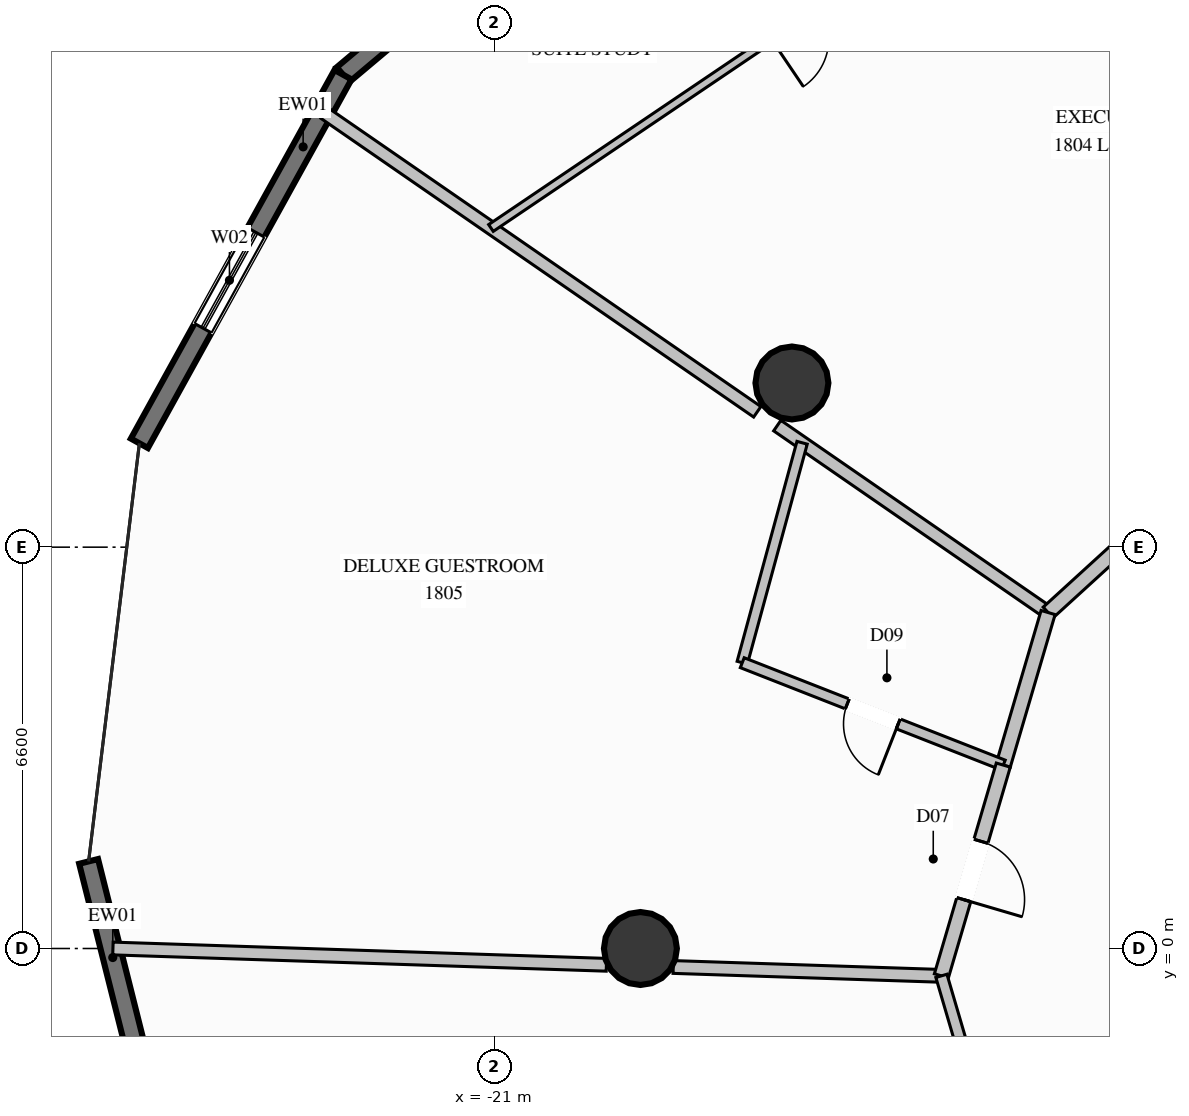
"""IFC4 building model, lengths in metres.
Left out: names, types, materials, properties, quantities, classifications, styles, units other than length and angle.
Written with IfcOpenShell. Run it as: python <this file> out.ifc"""

import sys

from ifc_helpers import new_model, si_unit, direction, frame, frame_2d, origin, origin_2d, place, context, subcontext, project, spatial, rectangle, circle, extrude, element, fill, save


model = new_model("IFC4")
c1 = context("Model", 3, precision=1e-05, world=origin(), true_north=direction((0.0, 1.0)))
c2 = subcontext(c1, "Body", "Model", "MODEL_VIEW")
j1 = project(units=[si_unit("LENGTHUNIT", "METRE"), si_unit("PLANEANGLEUNIT", "RADIAN")], contexts=[c1])
p1 = place(None, origin())
s1 = spatial("IfcSite", under=j1, at=p1, CompositionType="ELEMENT")
p2 = place(p1, origin())
s2 = spatial("IfcBuilding", under=s1, at=p2, CompositionType="ELEMENT")
p3 = place(p2, frame((0.0, 0.0, 68.0)))
s3 = spatial("IfcBuildingStorey", under=s2, at=p3, CompositionType="ELEMENT", Elevation=68.0)
for number, where, z_axis, x_axis in (
    (1, (-16.108, 9.3, 0.0), (0.0, 0.0, 1.0), (1.0, 0.0, 0.0)),
    (2, (-18.6, 0.0, 0.0), (0.0, 0.0, 1.0), (1.0, 0.0, 0.0)),
):
    element("IfcColumn", number, at=place(p3, frame(where, z_axis=z_axis, x_axis=x_axis)), inside=s3, PredefinedType="COLUMN", context=c2, shape_type="SweptSolid", body=[
        extrude(circle(Radius=0.6, at=origin_2d()), origin(), (0.0, 0.0, 1.0), 3.6),
    ])
p4 = place(p3, frame((-23.491, 14.37, 0.0), z_axis=(0.0, 0.0, 1.0), x_axis=(0.765388915414, 0.643568029164, 0.0)))
e3 = element("IfcWall", 3, at=p4, inside=s3, PredefinedType="SOLIDWALL", context=c2, shape_type="SweptSolid", body=[
    extrude(rectangle(XDim=7.233, YDim=0.32, at=frame_2d((3.616, 0.0))), origin(), (0.0, 0.0, 1.0), 3.34),
])
p5 = place(p4, frame((2.289, 0.0, 0.35)))
e4 = element("IfcOpeningElement", 4, at=p5, cuts=e3, PredefinedType="OPENING", context=c2, shape_type="SweptSolid", body=[
    extrude(rectangle(XDim=1.8, YDim=2.6, at=frame_2d((0.9, 1.3))), frame((0.0, 0.17, 0.0), z_axis=(0.0, -1.0, 0.0), x_axis=(1.0, 0.0, 0.0)), (0.0, 0.0, 1.0), 0.34),
])
p6 = place(p3, frame((-26.84, 8.308, 0.0), z_axis=(0.0, 0.0, 1.0), x_axis=(0.483582354317, 0.875298867013, 0.0)))
e5 = element("IfcWall", 5, at=p6, inside=s3, PredefinedType="SOLIDWALL", context=c2, shape_type="SweptSolid", body=[
    extrude(rectangle(XDim=6.926, YDim=0.32, at=frame_2d((3.463, 0.0))), origin(), (0.0, 0.0, 1.0), 3.34),
])
p7 = place(p6, frame((2.163, 0.0, 0.35)))
e6 = element("IfcOpeningElement", 6, at=p7, cuts=e5, PredefinedType="OPENING", context=c2, shape_type="SweptSolid", body=[
    extrude(rectangle(XDim=1.8, YDim=2.6, at=frame_2d((0.9, 1.3))), frame((0.0, 0.17, 0.0), z_axis=(0.0, -1.0, 0.0), x_axis=(1.0, 0.0, 0.0)), (0.0, 0.0, 1.0), 0.34),
])
p8 = place(p3, frame((-25.913, -5.583, 0.0), z_axis=(0.0, 0.0, 1.0), x_axis=(-0.243607685094, 0.969873855593, 0.0)))
e7 = element("IfcWall", 7, at=p8, inside=s3, PredefinedType="SOLIDWALL", context=c2, shape_type="SweptSolid", body=[
    extrude(rectangle(XDim=7.233, YDim=0.32, at=frame_2d((3.616, 0.0))), origin(), (0.0, 0.0, 1.0), 3.34),
])
p9 = place(p8, frame((1.923, 0.0, 0.35)))
e8 = element("IfcOpeningElement", 8, at=p9, cuts=e7, PredefinedType="OPENING", context=c2, shape_type="SweptSolid", body=[
    extrude(rectangle(XDim=1.8, YDim=2.6, at=frame_2d((0.9, 1.3))), frame((0.0, 0.17, 0.0), z_axis=(0.0, -1.0, 0.0), x_axis=(1.0, 0.0, 0.0)), (0.0, 0.0, 1.0), 0.34),
])
p10 = place(p3, frame((-11.895, 5.525, 0.0), z_axis=(0.0, 0.0, 1.0), x_axis=(-0.823003351356, 0.56803651613, 0.0)))
e9 = element("IfcWall", 9, at=p10, inside=s3, PredefinedType="PARTITIONING", context=c2, shape_type="SweptSolid", body=[
    extrude(rectangle(XDim=5.412, YDim=0.21, at=frame_2d((2.706, 0.0))), origin(), (0.0, 0.0, 1.0), 3.34),
])
p11 = place(p3, frame((-16.678, 8.826, 0.0), z_axis=(0.0, 0.0, 1.0), x_axis=(-0.823003432382, 0.568036398735, 0.0)))
e10 = element("IfcWall", 10, at=p11, inside=s3, PredefinedType="PARTITIONING", context=c2, shape_type="SweptSolid", body=[
    extrude(rectangle(XDim=8.647, YDim=0.21, at=frame_2d((4.324, 0.0))), origin(), (0.0, 0.0, 1.0), 3.34),
])
p12 = place(p3, frame((-13.65, -0.45, 0.0), z_axis=(0.0, 0.0, 1.0), x_axis=(-0.999452495438, 0.033086392398, 0.0)))
e11 = element("IfcWall", 11, at=p12, inside=s3, PredefinedType="PARTITIONING", context=c2, shape_type="SweptSolid", body=[
    extrude(rectangle(XDim=4.413, YDim=0.21, at=frame_2d((2.206, 0.0))), origin(), (0.0, 0.0, 1.0), 2.709),
])
p13 = place(p3, frame((-19.159, -0.268, 0.0), z_axis=(0.0, 0.0, 1.0), x_axis=(-0.999454971643, 0.033011507952, 0.0)))
e12 = element("IfcWall", 12, at=p13, inside=s3, PredefinedType="PARTITIONING", context=c2, shape_type="SweptSolid", body=[
    extrude(rectangle(XDim=8.12, YDim=0.21, at=frame_2d((4.06, 0.0))), origin(), (0.0, 0.0, 1.0), 3.34),
])
p14 = place(p3, frame((-7.1, 9.899, 0.0), z_axis=(0.0, 0.0, 1.0), x_axis=(-0.73878836807, -0.673937495028, 0.0)))
e13 = element("IfcWall", 13, at=p14, inside=s3, PredefinedType="PARTITIONING", context=c2, shape_type="SweptSolid", body=[
    extrude(rectangle(XDim=6.49, YDim=0.24, at=frame_2d((3.245, 0.0))), origin(), (0.0, 0.0, 1.0), 3.34),
])
p15 = place(p3, frame((-11.059, 18.604, 0.0), z_axis=(0.0, 0.0, 1.0), x_axis=(-0.828635640213, -0.559788331219, 0.0)))
e14 = element("IfcWall", 14, at=p15, inside=s3, PredefinedType="PARTITIONING", context=c2, shape_type="SweptSolid", body=[
    extrude(rectangle(XDim=12.067, YDim=0.135, at=frame_2d((6.033, 0.0))), origin(), (0.0, 0.0, 1.0), 3.34),
])
p16 = place(p15, frame((5.558, 0.0, 0.0)))
e15 = element("IfcOpeningElement", 15, at=p16, cuts=e14, PredefinedType="OPENING", context=c2, shape_type="SweptSolid", body=[
    extrude(rectangle(XDim=0.95, YDim=2.1, at=frame_2d((0.475, 1.05))), frame((0.0, 0.078, 0.0), z_axis=(0.0, -1.0, 0.0), x_axis=(1.0, 0.0, 0.0)), (0.0, 0.0, 1.0), 0.155),
])
p17 = place(p3, frame((-11.895, 5.525, 0.0), z_axis=(0.0, 0.0, 1.0), x_axis=(-0.281878178616, -0.9594502032, 0.0)))
e16 = element("IfcWall", 16, at=p17, inside=s3, PredefinedType="PARTITIONING", context=c2, shape_type="SweptSolid", body=[
    extrude(rectangle(XDim=2.615, YDim=0.24, at=frame_2d((1.307, 0.0))), origin(), (0.0, 0.0, 1.0), 3.34),
])
p18 = place(p3, frame((-15.941, 8.317, 0.0), z_axis=(0.0, 0.0, 1.0), x_axis=(-0.262544204064, -0.964919966066, 0.0)))
e17 = element("IfcWall", 17, at=p18, inside=s3, PredefinedType="PLUMBINGWALL", context=c2, shape_type="SweptSolid", body=[
    extrude(rectangle(XDim=3.749, YDim=0.175, at=frame_2d((1.874, 0.0))), origin(), (0.0, 0.0, 1.0), 2.793),
])
p19 = place(p3, frame((-12.632, 3.016, 0.0), z_axis=(0.0, 0.0, 1.0), x_axis=(-0.930949556546, 0.365147810026, 0.0)))
e18 = element("IfcWall", 18, at=p19, inside=s3, PredefinedType="PLUMBINGWALL", context=c2, shape_type="SweptSolid", body=[
    extrude(rectangle(XDim=4.611, YDim=0.175, at=frame_2d((2.306, 0.0))), origin(), (0.0, 0.0, 1.0), 3.34),
])
p20 = place(p19, frame((1.856, 0.0, 0.0)))
e19 = element("IfcOpeningElement", 19, at=p20, cuts=e18, PredefinedType="OPENING", context=c2, shape_type="SweptSolid", body=[
    extrude(rectangle(XDim=0.9, YDim=2.1, at=frame_2d((0.45, 1.05))), frame((0.0, 0.098, 0.0), z_axis=(0.0, -1.0, 0.0), x_axis=(1.0, 0.0, 0.0)), (0.0, 0.0, 1.0), 0.195),
])
p21 = place(p3, frame((-12.632, 3.016, 0.0), z_axis=(0.0, 0.0, 1.0), x_axis=(-0.281756491287, -0.959485945503, 0.0)))
e20 = element("IfcWall", 20, at=p21, inside=s3, PredefinedType="PARTITIONING", context=c2, shape_type="SweptSolid", body=[
    extrude(rectangle(XDim=3.612, YDim=0.24, at=frame_2d((1.806, 0.0))), origin(), (0.0, 0.0, 1.0), 3.34),
])
p22 = place(p21, frame((1.306, 0.0, 0.0)))
e21 = element("IfcOpeningElement", 21, at=p22, cuts=e20, PredefinedType="OPENING", context=c2, shape_type="SweptSolid", body=[
    extrude(rectangle(XDim=1.0, YDim=2.2, at=frame_2d((0.5, 1.1))), frame((0.0, 0.13, 0.0), z_axis=(0.0, -1.0, 0.0), x_axis=(1.0, 0.0, 0.0)), (0.0, 0.0, 1.0), 0.26),
])
p23 = place(p3, frame((-13.65, -0.45, 0.0), z_axis=(0.0, 0.0, 1.0), x_axis=(0.281796988209, -0.959474052508, 0.0)))
e22 = element("IfcWall", 22, at=p23, inside=s3, PredefinedType="PARTITIONING", context=c2, shape_type="SweptSolid", body=[
    extrude(rectangle(XDim=6.228, YDim=0.19, at=frame_2d((3.114, 0.0))), origin(), (0.0, 0.0, 1.0), 3.34),
])
p24 = place(p23, frame((2.639, 0.0, 0.0)))
e23 = element("IfcOpeningElement", 23, at=p24, cuts=e22, PredefinedType="OPENING", context=c2, shape_type="SweptSolid", body=[
    extrude(rectangle(XDim=0.95, YDim=2.1, at=frame_2d((0.475, 1.05))), frame((0.0, 0.105, 0.0), z_axis=(0.0, -1.0, 0.0), x_axis=(1.0, 0.0, 0.0)), (0.0, 0.0, 1.0), 0.21),
])
p25 = place(p7, origin())
e24 = element("IfcWindow", 24, at=p25, inside=s3, PartitioningType="SINGLE_PANEL", PredefinedType="WINDOW", context=c2, shape_type="SweptSolid", body=[
    extrude(rectangle(XDim=1.8, YDim=2.6, at=frame_2d((0.9, 1.3))), frame((0.0, 0.03, 0.0), z_axis=(0.0, -1.0, 0.0), x_axis=(1.0, 0.0, 0.0)), (0.0, 0.0, 1.0), 0.06),
])
fill(e6, e24)
p26 = place(p20, origin())
e25 = element("IfcDoor", 25, at=p26, inside=s3, OperationType="SINGLE_SWING_LEFT", PredefinedType="DOOR", context=c2, shape_type="SweptSolid", body=[
    extrude(rectangle(XDim=0.9, YDim=2.1, at=frame_2d((0.45, 1.05))), frame((0.0, 0.025, 0.0), z_axis=(0.0, -1.0, 0.0), x_axis=(1.0, 0.0, 0.0)), (0.0, 0.0, 1.0), 0.05),
])
fill(e19, e25)
p27 = place(p22, origin())
e26 = element("IfcDoor", 26, at=p27, inside=s3, OperationType="SINGLE_SWING_RIGHT", PredefinedType="DOOR", context=c2, shape_type="SweptSolid", body=[
    extrude(rectangle(XDim=1.0, YDim=2.2, at=frame_2d((0.5, 1.1))), frame((0.0, 0.025, 0.0), z_axis=(0.0, -1.0, 0.0), x_axis=(1.0, 0.0, 0.0)), (0.0, 0.0, 1.0), 0.05),
])
fill(e21, e26)
save(model, sys.argv[1])
